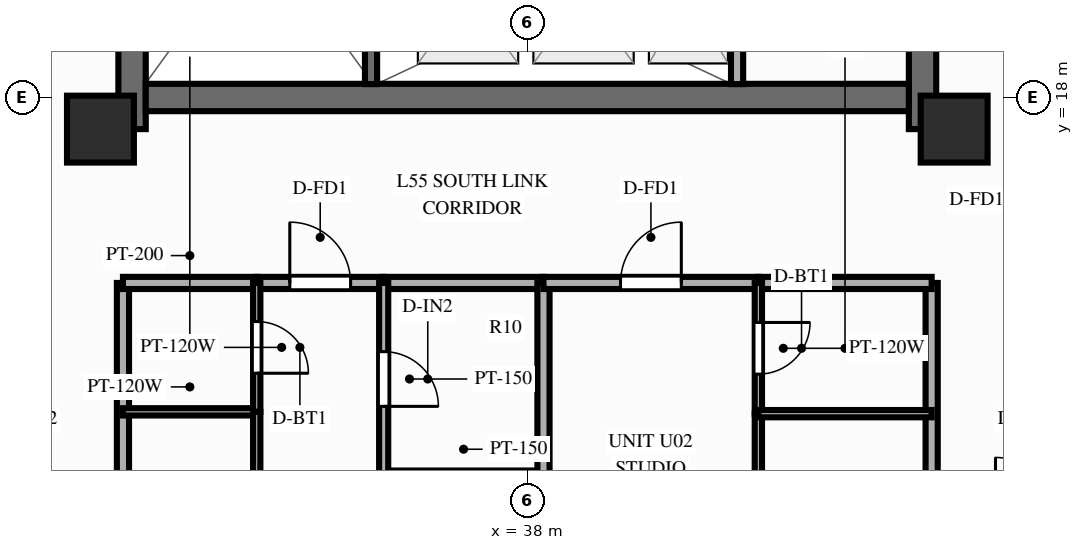
"""IFC4 building model, lengths in metres.
Left out: names, types, materials, properties, quantities, classifications, styles, units other than length and angle.
Written with IfcOpenShell. Run it as: python <this file> out.ifc"""

import sys

from ifc_helpers import new_model, si_unit, direction, frame, frame_2d, origin, origin_2d, place, context, subcontext, project, spatial, rectangle, extrude, source, transform, mapped, element, fill, save


model = new_model("IFC4")
c1 = context("Model", 3, precision=1e-05, world=origin(), true_north=direction((0.0, 1.0)))
c2 = subcontext(c1, "Body", "Model", "MODEL_VIEW")
j1 = project(units=[si_unit("LENGTHUNIT", "METRE"), si_unit("PLANEANGLEUNIT", "RADIAN")], contexts=[c1])
p1 = place(None, origin())
s1 = spatial("IfcSite", under=j1, at=p1, CompositionType="ELEMENT")
p2 = place(p1, origin())
s2 = spatial("IfcBuilding", under=s1, at=p2, CompositionType="ELEMENT")
p3 = place(p2, frame((0.0, 0.0, 176.8)))
s3 = spatial("IfcBuildingStorey", under=s2, at=p3, CompositionType="ELEMENT", Elevation=176.8)
p4 = place(p3, frame((31.5, 17.48, 0.0), z_axis=(0.0, 0.0, 1.0), x_axis=(0.0, 1.0, 0.0)))
e1 = element("IfcWall", 1, at=p4, inside=s3, PredefinedType="SHEAR", context=c2, shape_type="SweptSolid", body=[
    extrude(rectangle(XDim=19.04, YDim=0.45, at=frame_2d((9.52, 0.0))), origin(), (0.0, 0.0, 1.0), 3.0),
])
p5 = place(p4, frame((6.32, 0.0, 0.0)))
e2 = element("IfcOpeningElement", 2, at=p5, cuts=e1, PredefinedType="OPENING", context=c2, shape_type="SweptSolid", body=[
    extrude(rectangle(XDim=1.1, YDim=2.15, at=frame_2d((0.55, 1.075))), frame((0.0, 0.237, 0.0), z_axis=(0.0, -1.0, 0.0), x_axis=(1.0, 0.0, 0.0)), (0.0, 0.0, 1.0), 0.474),
])
p6 = place(p3, frame((44.5, 17.48, 0.0), z_axis=(0.0, 0.0, 1.0), x_axis=(0.0, 1.0, 0.0)))
e3 = element("IfcWall", 3, at=p6, inside=s3, PredefinedType="SHEAR", context=c2, shape_type="SweptSolid", body=[
    extrude(rectangle(XDim=19.04, YDim=0.45, at=frame_2d((9.52, 0.0))), origin(), (0.0, 0.0, 1.0), 3.0),
])
p7 = place(p6, frame((12.67, 0.0, 0.0), z_axis=(0.0, 0.0, 1.0), x_axis=(-1.0, 0.0, 0.0)))
e4 = element("IfcOpeningElement", 4, at=p7, cuts=e3, PredefinedType="OPENING", context=c2, shape_type="SweptSolid", body=[
    extrude(rectangle(XDim=1.1, YDim=2.15, at=frame_2d((0.55, 1.075))), frame((0.0, 0.237, 0.0), z_axis=(0.0, -1.0, 0.0), x_axis=(1.0, 0.0, 0.0)), (0.0, 0.0, 1.0), 0.474),
])
p8 = place(p3, frame((31.725, 18.0, 0.0), z_axis=(0.0, 0.0, 1.0), x_axis=(1.0, 0.0, 0.0)))
e5 = element("IfcWall", 5, at=p8, inside=s3, PredefinedType="SHEAR", context=c2, shape_type="SweptSolid", body=[
    extrude(rectangle(XDim=12.55, YDim=0.45, at=frame_2d((6.275, 0.0))), origin(), (0.0, 0.0, 1.0), 3.0),
])
m1 = source(origin(), c2, "Body", "SweptSolid", [
    extrude(rectangle(XDim=1.1, YDim=1.1, at=origin_2d()), origin(), (0.0, 0.0, 1.0), 3.0),
])
for number, where, z_axis, x_axis in (
    (6, (30.98, 17.48, 0.0), (0.0, 0.0, 1.0), (1.0, 0.0, 0.0)),
    (7, (45.02, 17.48, 0.0), (0.0, 0.0, 1.0), (1.0, 0.0, 0.0)),
):
    element("IfcColumn", number, at=place(p3, frame(where, z_axis=z_axis, x_axis=x_axis)), inside=s3, PredefinedType="COLUMN", context=c2, shape_type="MappedRepresentation", body=[
        mapped(m1, transform((0.0, 0.0, 0.0), scale=1.0)),
    ])
p9 = place(p3, frame((41.45, 18.22, 0.0), z_axis=(0.0, 0.0, 1.0), x_axis=(0.0, 1.0, 0.0)))
e8 = element("IfcWall", 8, at=p9, inside=s3, PredefinedType="PARTITIONING", context=c2, shape_type="SweptSolid", body=[
    extrude(rectangle(XDim=2.86, YDim=0.2, at=frame_2d((1.43, 0.0))), origin(), (0.0, 0.0, 1.0), 2.79),
])
p10 = place(p3, frame((35.43, 18.22, 0.0), z_axis=(0.0, 0.0, 1.0), x_axis=(0.0, 1.0, 0.0)))
e9 = element("IfcWall", 9, at=p10, inside=s3, PredefinedType="SOLIDWALL", context=c2, shape_type="SweptSolid", body=[
    extrude(rectangle(XDim=7.22, YDim=0.2, at=frame_2d((3.61, 0.0))), origin(), (0.0, 0.0, 1.0), 2.79),
])
p11 = place(p10, frame((6.68, 0.0, 0.0), z_axis=(0.0, 0.0, 1.0), x_axis=(-1.0, 0.0, 0.0)))
e10 = element("IfcOpeningElement", 10, at=p11, cuts=e9, PredefinedType="OPENING", context=c2, shape_type="SweptSolid", body=[
    extrude(rectangle(XDim=1.1, YDim=2.15, at=frame_2d((0.55, 1.075))), frame((0.0, 0.112, 0.0), z_axis=(0.0, -1.0, 0.0), x_axis=(1.0, 0.0, 0.0)), (0.0, 0.0, 1.0), 0.224),
])
for number, where, z_axis, x_axis in (
    (11, (31.35, 14.95, 0.0), (0.0, 0.0, 1.0), (0.0, -1.0, 0.0)),
    (12, (44.65, 14.95, 0.0), (0.0, 0.0, 1.0), (0.0, -1.0, 0.0)),
):
    element("IfcWall", number, at=place(p3, frame(where, z_axis=z_axis, x_axis=x_axis)), inside=s3, PredefinedType="PARTITIONING", context=c2, shape_type="SweptSolid", body=[
        extrude(rectangle(XDim=8.8, YDim=0.2, at=frame_2d((4.4, 0.0))), origin(), (0.0, 0.0, 1.0), 2.39),
    ])
p12 = place(p3, frame((31.35, 14.95, 0.0), z_axis=(0.0, 0.0, 1.0), x_axis=(1.0, 0.0, 0.0)))
e13 = element("IfcWall", 13, at=p12, inside=s3, PredefinedType="PARTITIONING", context=c2, shape_type="SweptSolid", body=[
    extrude(rectangle(XDim=2.2, YDim=0.2, at=frame_2d((1.1, 0.0))), origin(), (0.0, 0.0, 1.0), 2.79),
])
p13 = place(p3, frame((33.55, 14.95, 0.0), z_axis=(0.0, 0.0, 1.0), x_axis=(1.0, 0.0, 0.0)))
e14 = element("IfcWall", 14, at=p13, inside=s3, PredefinedType="PARTITIONING", context=c2, shape_type="SweptSolid", body=[
    extrude(rectangle(XDim=2.088, YDim=0.2, at=frame_2d((1.044, 0.0))), origin(), (0.0, 0.0, 1.0), 2.79),
])
p14 = place(p13, frame((0.544, 0.0, 0.0)))
e15 = element("IfcOpeningElement", 15, at=p14, cuts=e14, PredefinedType="OPENING", context=c2, shape_type="SweptSolid", body=[
    extrude(rectangle(XDim=1.0, YDim=2.15, at=frame_2d((0.5, 1.075))), frame((0.0, 0.112, 0.0), z_axis=(0.0, -1.0, 0.0), x_axis=(1.0, 0.0, 0.0)), (0.0, 0.0, 1.0), 0.224),
])
p15 = place(p3, frame((35.638, 14.95, 0.0), z_axis=(0.0, 0.0, 1.0), x_axis=(1.0, 0.0, 0.0)))
e16 = element("IfcWall", 16, at=p15, inside=s3, PredefinedType="PARTITIONING", context=c2, shape_type="SweptSolid", body=[
    extrude(rectangle(XDim=2.628, YDim=0.2, at=frame_2d((1.314, 0.0))), origin(), (0.0, 0.0, 1.0), 2.79),
])
p16 = place(p3, frame((31.35, 12.83, 0.0), z_axis=(0.0, 0.0, 1.0), x_axis=(1.0, 0.0, 0.0)))
e17 = element("IfcWall", 17, at=p16, inside=s3, PredefinedType="PARTITIONING", context=c2, shape_type="SweptSolid", body=[
    extrude(rectangle(XDim=2.2, YDim=0.12, at=frame_2d((1.1, 0.0))), origin(), (0.0, 0.0, 1.0), 2.79),
])
p17 = place(p3, frame((33.55, 14.95, 0.0), z_axis=(0.0, 0.0, 1.0), x_axis=(0.0, -1.0, 0.0)))
e18 = element("IfcWall", 18, at=p17, inside=s3, PredefinedType="PARTITIONING", context=c2, shape_type="SweptSolid", body=[
    extrude(rectangle(XDim=2.12, YDim=0.12, at=frame_2d((1.06, 0.0))), origin(), (0.0, 0.0, 1.0), 2.79),
])
p18 = place(p17, frame((0.635, 0.0, 0.0)))
e19 = element("IfcOpeningElement", 19, at=p18, cuts=e18, PredefinedType="OPENING", context=c2, shape_type="SweptSolid", body=[
    extrude(rectangle(XDim=0.85, YDim=2.05, at=frame_2d((0.425, 1.025))), frame((0.0, 0.072, 0.0), z_axis=(0.0, -1.0, 0.0), x_axis=(1.0, 0.0, 0.0)), (0.0, 0.0, 1.0), 0.144),
])
p19 = place(p3, frame((33.55, 12.83, 0.0), z_axis=(0.0, 0.0, 1.0), x_axis=(0.0, -1.0, 0.0)))
e20 = element("IfcWall", 20, at=p19, inside=s3, PredefinedType="PARTITIONING", context=c2, shape_type="SweptSolid", body=[
    extrude(rectangle(XDim=1.04, YDim=0.12, at=frame_2d((0.52, 0.0))), origin(), (0.0, 0.0, 1.0), 2.79),
])
p20 = place(p3, frame((35.638, 14.95, 0.0), z_axis=(0.0, 0.0, 1.0), x_axis=(0.0, -1.0, 0.0)))
e21 = element("IfcWall", 21, at=p20, inside=s3, PredefinedType="PARTITIONING", context=c2, shape_type="SweptSolid", body=[
    extrude(rectangle(XDim=3.16, YDim=0.15, at=frame_2d((1.58, 0.0))), origin(), (0.0, 0.0, 1.0), 2.79),
])
p21 = place(p20, frame((1.13, 0.0, 0.0)))
e22 = element("IfcOpeningElement", 22, at=p21, cuts=e21, PredefinedType="OPENING", context=c2, shape_type="SweptSolid", body=[
    extrude(rectangle(XDim=0.9, YDim=2.1, at=frame_2d((0.45, 1.05))), frame((0.0, 0.087, 0.0), z_axis=(0.0, -1.0, 0.0), x_axis=(1.0, 0.0, 0.0)), (0.0, 0.0, 1.0), 0.174),
])
p22 = place(p3, frame((38.266, 14.95, 0.0), z_axis=(0.0, 0.0, 1.0), x_axis=(0.0, -1.0, 0.0)))
e23 = element("IfcWall", 23, at=p22, inside=s3, PredefinedType="PARTITIONING", context=c2, shape_type="SweptSolid", body=[
    extrude(rectangle(XDim=8.8, YDim=0.2, at=frame_2d((4.4, 0.0))), origin(), (0.0, 0.0, 1.0), 2.79),
])
p23 = place(p3, frame((38.266, 14.95, 0.0), z_axis=(0.0, 0.0, 1.0), x_axis=(1.0, 0.0, 0.0)))
e24 = element("IfcWall", 24, at=p23, inside=s3, PredefinedType="PARTITIONING", context=c2, shape_type="SweptSolid", body=[
    extrude(rectangle(XDim=3.534, YDim=0.2, at=frame_2d((1.767, 0.0))), origin(), (0.0, 0.0, 1.0), 2.79),
])
p24 = place(p23, frame((1.267, 0.0, 0.0)))
e25 = element("IfcOpeningElement", 25, at=p24, cuts=e24, PredefinedType="OPENING", context=c2, shape_type="SweptSolid", body=[
    extrude(rectangle(XDim=1.0, YDim=2.15, at=frame_2d((0.5, 1.075))), frame((0.0, 0.112, 0.0), z_axis=(0.0, -1.0, 0.0), x_axis=(1.0, 0.0, 0.0)), (0.0, 0.0, 1.0), 0.224),
])
p25 = place(p3, frame((41.8, 14.95, 0.0), z_axis=(0.0, 0.0, 1.0), x_axis=(1.0, 0.0, 0.0)))
e26 = element("IfcWall", 26, at=p25, inside=s3, PredefinedType="PARTITIONING", context=c2, shape_type="SweptSolid", body=[
    extrude(rectangle(XDim=2.85, YDim=0.2, at=frame_2d((1.425, 0.0))), origin(), (0.0, 0.0, 1.0), 2.79),
])
p26 = place(p3, frame((41.8, 14.95, 0.0), z_axis=(0.0, 0.0, 1.0), x_axis=(0.0, -1.0, 0.0)))
e27 = element("IfcWall", 27, at=p26, inside=s3, PredefinedType="PARTITIONING", context=c2, shape_type="SweptSolid", body=[
    extrude(rectangle(XDim=2.15, YDim=0.12, at=frame_2d((1.075, 0.0))), origin(), (0.0, 0.0, 1.0), 2.79),
])
p27 = place(p26, frame((0.65, 0.0, 0.0)))
e28 = element("IfcOpeningElement", 28, at=p27, cuts=e27, PredefinedType="OPENING", context=c2, shape_type="SweptSolid", body=[
    extrude(rectangle(XDim=0.85, YDim=2.05, at=frame_2d((0.425, 1.025))), frame((0.0, 0.072, 0.0), z_axis=(0.0, -1.0, 0.0), x_axis=(1.0, 0.0, 0.0)), (0.0, 0.0, 1.0), 0.144),
])
p28 = place(p3, frame((41.8, 12.8, 0.0), z_axis=(0.0, 0.0, 1.0), x_axis=(0.0, -1.0, 0.0)))
e29 = element("IfcWall", 29, at=p28, inside=s3, PredefinedType="PARTITIONING", context=c2, shape_type="SweptSolid", body=[
    extrude(rectangle(XDim=1.01, YDim=0.12, at=frame_2d((0.505, 0.0))), origin(), (0.0, 0.0, 1.0), 2.79),
])
p29 = place(p3, frame((41.8, 12.8, 0.0), z_axis=(0.0, 0.0, 1.0), x_axis=(1.0, 0.0, 0.0)))
e30 = element("IfcWall", 30, at=p29, inside=s3, PredefinedType="PARTITIONING", context=c2, shape_type="SweptSolid", body=[
    extrude(rectangle(XDim=2.85, YDim=0.12, at=frame_2d((1.425, 0.0))), origin(), (0.0, 0.0, 1.0), 2.79),
])
m2 = source(origin(), c2, "Body", "SweptSolid", [
    extrude(rectangle(XDim=1.0, YDim=2.15, at=frame_2d((0.5, 1.075))), frame((0.0, 0.025, 0.0), z_axis=(0.0, -1.0, 0.0), x_axis=(1.0, 0.0, 0.0)), (0.0, 0.0, 1.0), 0.05),
])
p30 = place(p14, origin())
e31 = element("IfcDoor", 31, at=p30, inside=s3, OperationType="SINGLE_SWING_LEFT", PredefinedType="DOOR", context=c2, shape_type="MappedRepresentation", body=[
    mapped(m2, transform((0.0, 0.0, 0.0), scale=1.0)),
])
fill(e15, e31)
m3 = source(origin(), c2, "Body", "SweptSolid", [
    extrude(rectangle(XDim=0.85, YDim=2.05, at=frame_2d((0.425, 1.025))), frame((0.0, 0.025, 0.0), z_axis=(0.0, -1.0, 0.0), x_axis=(1.0, 0.0, 0.0)), (0.0, 0.0, 1.0), 0.05),
])
p31 = place(p18, origin())
e32 = element("IfcDoor", 32, at=p31, inside=s3, OperationType="SINGLE_SWING_RIGHT", PredefinedType="DOOR", context=c2, shape_type="MappedRepresentation", body=[
    mapped(m3, transform((0.0, 0.0, 0.0), scale=1.0)),
])
fill(e19, e32)
m4 = source(origin(), c2, "Body", "SweptSolid", [
    extrude(rectangle(XDim=0.9, YDim=2.1, at=frame_2d((0.45, 1.05))), frame((0.0, 0.025, 0.0), z_axis=(0.0, -1.0, 0.0), x_axis=(1.0, 0.0, 0.0)), (0.0, 0.0, 1.0), 0.05),
])
p32 = place(p21, origin())
e33 = element("IfcDoor", 33, at=p32, inside=s3, OperationType="SINGLE_SWING_RIGHT", PredefinedType="DOOR", context=c2, shape_type="MappedRepresentation", body=[
    mapped(m4, transform((0.0, 0.0, 0.0), scale=1.0)),
])
fill(e22, e33)
p33 = place(p24, origin())
e34 = element("IfcDoor", 34, at=p33, inside=s3, OperationType="SINGLE_SWING_RIGHT", PredefinedType="DOOR", context=c2, shape_type="MappedRepresentation", body=[
    mapped(m2, transform((0.0, 0.0, 0.0), scale=1.0)),
])
fill(e25, e34)
p34 = place(p27, origin())
e35 = element("IfcDoor", 35, at=p34, inside=s3, OperationType="SINGLE_SWING_LEFT", PredefinedType="DOOR", context=c2, shape_type="MappedRepresentation", body=[
    mapped(m3, transform((0.0, 0.0, 0.0), scale=1.0)),
])
fill(e28, e35)
save(model, sys.argv[1])
